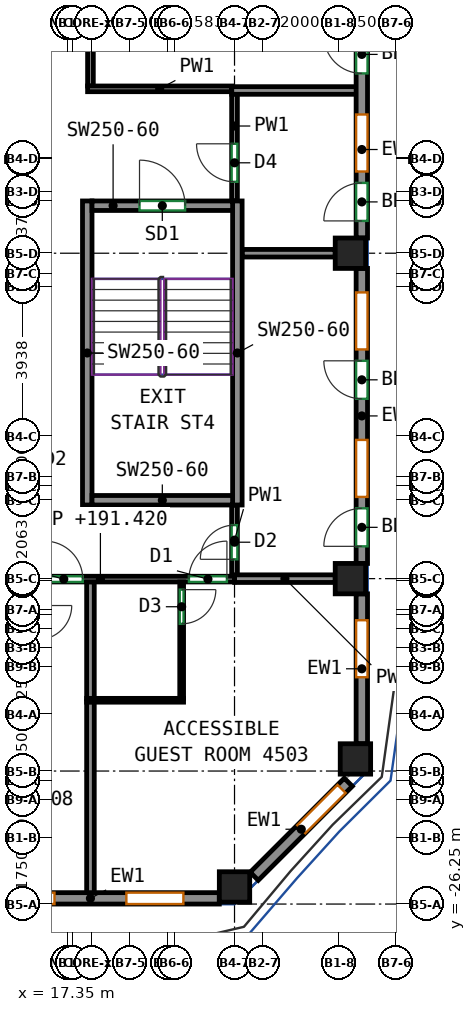
"""IFC4 building model, lengths in metres.
Left out: names, types, materials, properties, quantities, classifications, styles, units other than length and angle.
Written with IfcOpenShell. Run it as: python <this file> out.ifc"""

import sys

from ifc_helpers import new_model, si_unit, direction, frame, frame_2d, origin, origin_2d, place, context, subcontext, project, spatial, rectangle, extrude, source, transform, mapped, element, fill, save


model = new_model("IFC4")
c1 = context("Model", 3, precision=1e-05, world=origin(), true_north=direction((0.0, 1.0)))
c2 = subcontext(c1, "Body", "Model", "MODEL_VIEW")
j1 = project(units=[si_unit("LENGTHUNIT", "METRE"), si_unit("PLANEANGLEUNIT", "RADIAN")], contexts=[c1])
p1 = place(None, origin())
s1 = spatial("IfcSite", under=j1, at=p1, CompositionType="ELEMENT")
p2 = place(p1, origin())
s2 = spatial("IfcBuilding", under=s1, at=p2, CompositionType="ELEMENT")
p3 = place(p2, frame((0.0, 0.0, 188.9)))
s3 = spatial("IfcBuildingStorey", under=s2, at=p3, CompositionType="ELEMENT", Elevation=188.9)
m1 = source(origin(), c2, "Body", "SweptSolid", [
    extrude(rectangle(XDim=0.8, YDim=0.8, at=origin_2d()), origin(), (0.0, 0.0, 1.0), 3.12),
])
for number, where, z_axis, x_axis in (
    (1, (21.75, -25.8, 0.0), (0.0, 0.0, 1.0), (1.0, 0.0, 0.0)),
    (2, (24.8, -17.688, 0.0), (0.0, 0.0, 1.0), (1.0, 0.0, 0.0)),
    (3, (24.8, -9.125, 0.0), (0.0, 0.0, 1.0), (1.0, 0.0, 0.0)),
    (4, (24.932, -22.432, 0.0), (0.0, 0.0, 1.0), (1.0, 0.0, 0.0)),
):
    element("IfcColumn", number, at=place(p3, frame(where, z_axis=z_axis, x_axis=x_axis)), inside=s3, PredefinedType="COLUMN", context=c2, shape_type="MappedRepresentation", body=[
        mapped(m1, transform((0.0, 0.0, 0.0))),
    ])
m2 = source(origin(), c2, "Body", "SweptSolid", [
    extrude(rectangle(XDim=8.0, YDim=0.25, at=frame_2d((4.0, 0.0))), origin(), (0.0, 0.0, 1.0), 3.12),
])
for number, where, z_axis, x_axis in (
    (5, (17.875, -15.75, 0.0), (0.0, 0.0, 1.0), (0.0, 1.0, 0.0)),
    (6, (21.825, -15.75, 0.0), (0.0, 0.0, 1.0), (0.0, 1.0, 0.0)),
):
    element("IfcWall", number, at=place(p3, frame(where, z_axis=z_axis, x_axis=x_axis)), inside=s3, PredefinedType="SHEAR", context=c2, shape_type="MappedRepresentation", body=[
        mapped(m2, transform((0.0, 0.0, 0.0))),
    ])
m3 = source(origin(), c2, "Body", "SweptSolid", [
    extrude(rectangle(XDim=3.7, YDim=0.25, at=frame_2d((1.85, 0.0))), origin(), (0.0, 0.0, 1.0), 3.12),
])
p4 = place(p3, frame((18.0, -15.625, 0.0), z_axis=(0.0, 0.0, 1.0), x_axis=(1.0, 0.0, 0.0)))
e7 = element("IfcWall", 7, at=p4, inside=s3, PredefinedType="SHEAR", context=c2, shape_type="MappedRepresentation", body=[
    mapped(m3, transform((0.0, 0.0, 0.0))),
])
p5 = place(p3, frame((18.0, -7.875, 0.0), z_axis=(0.0, 0.0, 1.0), x_axis=(1.0, 0.0, 0.0)))
e8 = element("IfcWall", 8, at=p5, inside=s3, PredefinedType="SHEAR", context=c2, shape_type="MappedRepresentation", body=[
    mapped(m3, transform((0.0, 0.0, 0.0))),
])
p6 = place(p5, frame((1.25, 0.0, 0.0)))
e9 = element("IfcOpeningElement", 9, at=p6, cuts=e8, PredefinedType="OPENING", context=c2, shape_type="SweptSolid", body=[
    extrude(rectangle(XDim=1.2, YDim=2.1, at=frame_2d((0.6, 1.05))), frame((0.0, 0.135, 0.0), z_axis=(0.0, -1.0, 0.0), x_axis=(1.0, 0.0, 0.0)), (0.0, 0.0, 1.0), 0.27),
])
m4 = source(origin(), c2, "Body", "SweptSolid", [
    extrude(rectangle(XDim=6.783, YDim=0.3, at=frame_2d((3.392, 0.0))), origin(), (0.0, 0.0, 1.0), 3.12),
])
p7 = place(p3, frame((14.567, -26.1, 0.0), z_axis=(0.0, 0.0, 1.0), x_axis=(1.0, 0.0, 0.0)))
e10 = element("IfcWall", 10, at=p7, inside=s3, PredefinedType="SOLIDWALL", context=c2, shape_type="MappedRepresentation", body=[
    mapped(m4, transform((0.0, 0.0, 0.0))),
])
p8 = place(p7, frame((0.946, 0.0, 0.85)))
e11 = element("IfcOpeningElement", 11, at=p8, cuts=e10, PredefinedType="OPENING", context=c2, shape_type="SweptSolid", body=[
    extrude(rectangle(XDim=1.5, YDim=1.95, at=frame_2d((0.75, 0.975))), frame((0.0, 0.16, 0.0), z_axis=(0.0, -1.0, 0.0), x_axis=(1.0, 0.0, 0.0)), (0.0, 0.0, 1.0), 0.32),
])
p9 = place(p7, frame((4.337, 0.0, 0.85)))
e12 = element("IfcOpeningElement", 12, at=p9, cuts=e10, PredefinedType="OPENING", context=c2, shape_type="SweptSolid", body=[
    extrude(rectangle(XDim=1.5, YDim=1.95, at=frame_2d((0.75, 0.975))), frame((0.0, 0.16, 0.0), z_axis=(0.0, -1.0, 0.0), x_axis=(1.0, 0.0, 0.0)), (0.0, 0.0, 1.0), 0.32),
])
m5 = source(origin(), c2, "Body", "SweptSolid", [
    extrude(rectangle(XDim=3.5, YDim=0.3, at=frame_2d((1.75, 0.0))), origin(), (0.0, 0.0, 1.0), 3.12),
])
p10 = place(p3, frame((22.269, -25.519, 0.0), z_axis=(0.0, 0.0, 1.0), x_axis=(0.707141656123, 0.70707190453, 0.0)))
e13 = element("IfcWall", 13, at=p10, inside=s3, PredefinedType="SOLIDWALL", context=c2, shape_type="MappedRepresentation", body=[
    mapped(m5, transform((0.0, 0.0, 0.0))),
])
p11 = place(p10, frame((1.75, 0.0, 0.85)))
e14 = element("IfcOpeningElement", 14, at=p11, cuts=e13, PredefinedType="OPENING", context=c2, shape_type="SweptSolid", body=[
    extrude(rectangle(XDim=1.5, YDim=1.95, at=frame_2d((0.75, 0.975))), frame((0.0, 0.16, 0.0), z_axis=(0.0, -1.0, 0.0), x_axis=(1.0, 0.0, 0.0)), (0.0, 0.0, 1.0), 0.32),
])
m6 = source(origin(), c2, "Body", "SweptSolid", [
    extrude(rectangle(XDim=3.944, YDim=0.3, at=frame_2d((1.972, 0.0))), origin(), (0.0, 0.0, 1.0), 3.12),
])
p12 = place(p3, frame((25.1, -22.032, 0.0), z_axis=(0.0, 0.0, 1.0), x_axis=(0.0, 1.0, 0.0)))
e15 = element("IfcWall", 15, at=p12, inside=s3, PredefinedType="SOLIDWALL", context=c2, shape_type="MappedRepresentation", body=[
    mapped(m6, transform((0.0, 0.0, 0.0))),
])
p13 = place(p12, frame((1.75, 0.0, 0.85)))
e16 = element("IfcOpeningElement", 16, at=p13, cuts=e15, PredefinedType="OPENING", context=c2, shape_type="SweptSolid", body=[
    extrude(rectangle(XDim=1.5, YDim=1.95, at=frame_2d((0.75, 0.975))), frame((0.0, 0.16, 0.0), z_axis=(0.0, -1.0, 0.0), x_axis=(1.0, 0.0, 0.0)), (0.0, 0.0, 1.0), 0.32),
])
m7 = source(origin(), c2, "Body", "SweptSolid", [
    extrude(rectangle(XDim=7.763, YDim=0.3, at=frame_2d((3.881, 0.0))), origin(), (0.0, 0.0, 1.0), 3.12),
])
p14 = place(p3, frame((25.1, -17.288, 0.0), z_axis=(0.0, 0.0, 1.0), x_axis=(0.0, 1.0, 0.0)))
e17 = element("IfcWall", 17, at=p14, inside=s3, PredefinedType="SOLIDWALL", context=c2, shape_type="MappedRepresentation", body=[
    mapped(m7, transform((0.0, 0.0, 0.0))),
])
p15 = place(p14, frame((1.75, 0.0, 0.85)))
e18 = element("IfcOpeningElement", 18, at=p15, cuts=e17, PredefinedType="OPENING", context=c2, shape_type="SweptSolid", body=[
    extrude(rectangle(XDim=1.5, YDim=1.95, at=frame_2d((0.75, 0.975))), frame((0.0, 0.16, 0.0), z_axis=(0.0, -1.0, 0.0), x_axis=(1.0, 0.0, 0.0)), (0.0, 0.0, 1.0), 0.32),
])
p16 = place(p14, frame((0.45, 0.0, 0.0)))
e19 = element("IfcOpeningElement", 19, at=p16, cuts=e17, PredefinedType="OPENING", context=c2, shape_type="SweptSolid", body=[
    extrude(rectangle(XDim=1.0, YDim=2.1, at=frame_2d((0.5, 1.05))), frame((0.0, 0.16, 0.0), z_axis=(0.0, -1.0, 0.0), x_axis=(1.0, 0.0, 0.0)), (0.0, 0.0, 1.0), 0.32),
])
p17 = place(p14, frame((5.631, 0.0, 0.85)))
e20 = element("IfcOpeningElement", 20, at=p17, cuts=e17, PredefinedType="OPENING", context=c2, shape_type="SweptSolid", body=[
    extrude(rectangle(XDim=1.5, YDim=1.95, at=frame_2d((0.75, 0.975))), frame((0.0, 0.16, 0.0), z_axis=(0.0, -1.0, 0.0), x_axis=(1.0, 0.0, 0.0)), (0.0, 0.0, 1.0), 0.32),
])
p18 = place(p14, frame((4.331, 0.0, 0.0)))
e21 = element("IfcOpeningElement", 21, at=p18, cuts=e17, PredefinedType="OPENING", context=c2, shape_type="SweptSolid", body=[
    extrude(rectangle(XDim=1.0, YDim=2.1, at=frame_2d((0.5, 1.05))), frame((0.0, 0.16, 0.0), z_axis=(0.0, -1.0, 0.0), x_axis=(1.0, 0.0, 0.0)), (0.0, 0.0, 1.0), 0.32),
])
p19 = place(p3, frame((25.1, -8.725, 0.0), z_axis=(0.0, 0.0, 1.0), x_axis=(0.0, 1.0, 0.0)))
e22 = element("IfcWall", 22, at=p19, inside=s3, PredefinedType="SOLIDWALL", context=c2, shape_type="MappedRepresentation", body=[
    mapped(m7, transform((0.0, 0.0, 0.0))),
])
p20 = place(p19, frame((1.75, 0.0, 0.85)))
e23 = element("IfcOpeningElement", 23, at=p20, cuts=e22, PredefinedType="OPENING", context=c2, shape_type="SweptSolid", body=[
    extrude(rectangle(XDim=1.5, YDim=1.95, at=frame_2d((0.75, 0.975))), frame((0.0, 0.16, 0.0), z_axis=(0.0, -1.0, 0.0), x_axis=(1.0, 0.0, 0.0)), (0.0, 0.0, 1.0), 0.32),
])
p21 = place(p19, frame((0.45, 0.0, 0.0)))
e24 = element("IfcOpeningElement", 24, at=p21, cuts=e22, PredefinedType="OPENING", context=c2, shape_type="SweptSolid", body=[
    extrude(rectangle(XDim=1.0, YDim=2.1, at=frame_2d((0.5, 1.05))), frame((0.0, 0.16, 0.0), z_axis=(0.0, -1.0, 0.0), x_axis=(1.0, 0.0, 0.0)), (0.0, 0.0, 1.0), 0.32),
])
p22 = place(p19, frame((5.631, 0.0, 0.85)))
e25 = element("IfcOpeningElement", 25, at=p22, cuts=e22, PredefinedType="OPENING", context=c2, shape_type="SweptSolid", body=[
    extrude(rectangle(XDim=1.5, YDim=1.95, at=frame_2d((0.75, 0.975))), frame((0.0, 0.16, 0.0), z_axis=(0.0, -1.0, 0.0), x_axis=(1.0, 0.0, 0.0)), (0.0, 0.0, 1.0), 0.32),
])
p23 = place(p19, frame((4.331, 0.0, 0.0)))
e26 = element("IfcOpeningElement", 26, at=p23, cuts=e22, PredefinedType="OPENING", context=c2, shape_type="SweptSolid", body=[
    extrude(rectangle(XDim=1.0, YDim=2.1, at=frame_2d((0.5, 1.05))), frame((0.0, 0.16, 0.0), z_axis=(0.0, -1.0, 0.0), x_axis=(1.0, 0.0, 0.0)), (0.0, 0.0, 1.0), 0.32),
])
p24 = place(p3, frame((14.692, -17.7, 0.0), z_axis=(0.0, 0.0, 1.0), x_axis=(1.0, 0.0, 0.0)))
e27 = element("IfcWall", 27, at=p24, inside=s3, PredefinedType="PARTITIONING", context=c2, shape_type="SweptSolid", body=[
    extrude(rectangle(XDim=7.058, YDim=0.15, at=frame_2d((3.529, 0.0))), origin(), (0.0, 0.0, 1.0), 2.52),
])
p25 = place(p24, frame((2.065, 0.0, 0.0)))
e28 = element("IfcOpeningElement", 28, at=p25, cuts=e27, PredefinedType="OPENING", context=c2, shape_type="SweptSolid", body=[
    extrude(rectangle(XDim=1.0, YDim=2.1, at=frame_2d((0.5, 1.05))), frame((0.0, 0.085, 0.0), z_axis=(0.0, -1.0, 0.0), x_axis=(1.0, 0.0, 0.0)), (0.0, 0.0, 1.0), 0.17),
])
p26 = place(p24, frame((5.858, 0.0, 0.0)))
e29 = element("IfcOpeningElement", 29, at=p26, cuts=e27, PredefinedType="OPENING", context=c2, shape_type="SweptSolid", body=[
    extrude(rectangle(XDim=1.0, YDim=2.1, at=frame_2d((0.5, 1.05))), frame((0.0, 0.085, 0.0), z_axis=(0.0, -1.0, 0.0), x_axis=(1.0, 0.0, 0.0)), (0.0, 0.0, 1.0), 0.17),
])
p27 = place(p3, frame((17.959, -4.725, 0.0), z_axis=(0.0, 0.0, 1.0), x_axis=(0.0, 1.0, 0.0)))
e30 = element("IfcWall", 30, at=p27, inside=s3, PredefinedType="PARTITIONING", context=c2, shape_type="SweptSolid", body=[
    extrude(rectangle(XDim=8.35, YDim=0.15, at=frame_2d((4.175, 0.0))), origin(), (0.0, 0.0, 1.0), 3.12),
])
p28 = place(p27, frame((5.236, 0.0, 0.0)))
e31 = element("IfcOpeningElement", 31, at=p28, cuts=e30, PredefinedType="OPENING", context=c2, shape_type="SweptSolid", body=[
    extrude(rectangle(XDim=0.9, YDim=2.1, at=frame_2d((0.45, 1.05))), frame((0.0, 0.085, 0.0), z_axis=(0.0, -1.0, 0.0), x_axis=(1.0, 0.0, 0.0)), (0.0, 0.0, 1.0), 0.17),
])
p29 = place(p3, frame((17.884, -4.8, 0.0), z_axis=(0.0, 0.0, 1.0), x_axis=(1.0, 0.0, 0.0)))
e32 = element("IfcWall", 32, at=p29, inside=s3, PredefinedType="PARTITIONING", context=c2, shape_type="SweptSolid", body=[
    extrude(rectangle(XDim=3.793, YDim=0.15, at=frame_2d((1.896, 0.0))), origin(), (0.0, 0.0, 1.0), 3.12),
])
p30 = place(p3, frame((21.75, -7.75, 0.0), z_axis=(0.0, 0.0, 1.0), x_axis=(0.0, 1.0, 0.0)))
e33 = element("IfcWall", 33, at=p30, inside=s3, PredefinedType="PARTITIONING", context=c2, shape_type="SweptSolid", body=[
    extrude(rectangle(XDim=2.817, YDim=0.15, at=frame_2d((1.408, 0.0))), origin(), (0.0, 0.0, 1.0), 3.12),
])
p31 = place(p30, frame((0.504, 0.0, 0.0)))
e34 = element("IfcOpeningElement", 34, at=p31, cuts=e33, PredefinedType="OPENING", context=c2, shape_type="SweptSolid", body=[
    extrude(rectangle(XDim=1.0, YDim=2.1, at=frame_2d((0.5, 1.05))), frame((0.0, 0.085, 0.0), z_axis=(0.0, -1.0, 0.0), x_axis=(1.0, 0.0, 0.0)), (0.0, 0.0, 1.0), 0.17),
])
p32 = place(p3, frame((21.75, -17.598, 0.0), z_axis=(0.0, 0.0, 1.0), x_axis=(0.0, 1.0, 0.0)))
e35 = element("IfcWall", 35, at=p32, inside=s3, PredefinedType="PARTITIONING", context=c2, shape_type="SweptSolid", body=[
    extrude(rectangle(XDim=1.848, YDim=0.15, at=frame_2d((0.924, 0.0))), origin(), (0.0, 0.0, 1.0), 3.12),
])
p33 = place(p32, frame((0.419, 0.0, 0.0)))
e36 = element("IfcOpeningElement", 36, at=p33, cuts=e35, PredefinedType="OPENING", context=c2, shape_type="SweptSolid", body=[
    extrude(rectangle(XDim=0.9, YDim=2.1, at=frame_2d((0.45, 1.05))), frame((0.0, 0.085, 0.0), z_axis=(0.0, -1.0, 0.0), x_axis=(1.0, 0.0, 0.0)), (0.0, 0.0, 1.0), 0.17),
])
p34 = place(p3, frame((17.959, -26.0, 0.0), z_axis=(0.0, 0.0, 1.0), x_axis=(0.0, 1.0, 0.0)))
e37 = element("IfcWall", 37, at=p34, inside=s3, PredefinedType="PARTITIONING", context=c2, shape_type="SweptSolid", body=[
    extrude(rectangle(XDim=5.072, YDim=0.2, at=frame_2d((2.536, 0.0))), origin(), (0.0, 0.0, 1.0), 3.12),
])
p35 = place(p3, frame((17.959, -20.848, 0.0), z_axis=(0.0, 0.0, 1.0), x_axis=(0.0, 1.0, 0.0)))
e38 = element("IfcWall", 38, at=p35, inside=s3, PredefinedType="PARTITIONING", context=c2, shape_type="SweptSolid", body=[
    extrude(rectangle(XDim=3.071, YDim=0.2, at=frame_2d((1.535, 0.0))), origin(), (0.0, 0.0, 1.0), 3.12),
])
p36 = place(p3, frame((17.859, -20.888, 0.0), z_axis=(0.0, 0.0, 1.0), x_axis=(1.0, 0.0, 0.0)))
e39 = element("IfcWall", 39, at=p36, inside=s3, PredefinedType="PARTITIONING", context=c2, shape_type="SweptSolid", body=[
    extrude(rectangle(XDim=2.55, YDim=0.1, at=frame_2d((1.275, 0.0))), origin(), (0.0, 0.0, 1.0), 3.12),
])
p37 = place(p3, frame((20.359, -17.777, 0.0), z_axis=(0.0, 0.0, 1.0), x_axis=(0.0, -1.0, 0.0)))
e40 = element("IfcWall", 40, at=p37, inside=s3, PredefinedType="PARTITIONING", context=c2, shape_type="SweptSolid", body=[
    extrude(rectangle(XDim=3.061, YDim=0.1, at=frame_2d((1.53, 0.0))), origin(), (0.0, 0.0, 1.0), 3.12),
])
p38 = place(p37, frame((0.2, 0.0, 0.0)))
e41 = element("IfcOpeningElement", 41, at=p38, cuts=e40, PredefinedType="OPENING", context=c2, shape_type="SweptSolid", body=[
    extrude(rectangle(XDim=0.9, YDim=2.1, at=frame_2d((0.45, 1.05))), frame((0.0, 0.06, 0.0), z_axis=(0.0, -1.0, 0.0), x_axis=(1.0, 0.0, 0.0)), (0.0, 0.0, 1.0), 0.12),
])
p39 = place(p3, frame((21.752, -17.688, 0.0), z_axis=(0.0, 0.0, 1.0), x_axis=(1.0, 0.0, 0.0)))
e42 = element("IfcWall", 42, at=p39, inside=s3, PredefinedType="PARTITIONING", context=c2, shape_type="SweptSolid", body=[
    extrude(rectangle(XDim=2.648, YDim=0.2, at=frame_2d((1.324, 0.0))), origin(), (0.0, 0.0, 1.0), 2.52),
])
p40 = place(p3, frame((21.677, -4.843, 0.0), z_axis=(0.0, 0.0, 1.0), x_axis=(1.0, 0.0, 0.0)))
e43 = element("IfcWall", 43, at=p40, inside=s3, PredefinedType="PARTITIONING", context=c2, shape_type="SweptSolid", body=[
    extrude(rectangle(XDim=3.323, YDim=0.2, at=frame_2d((1.662, 0.0))), origin(), (0.0, 0.0, 1.0), 3.12),
])
p41 = place(p3, frame((21.95, -9.125, 0.0), z_axis=(0.0, 0.0, 1.0), x_axis=(1.0, 0.0, 0.0)))
e44 = element("IfcWall", 44, at=p41, inside=s3, PredefinedType="PARTITIONING", context=c2, shape_type="SweptSolid", body=[
    extrude(rectangle(XDim=2.45, YDim=0.2, at=frame_2d((1.225, 0.0))), origin(), (0.0, 0.0, 1.0), 3.12),
])
p42 = place(p8, origin())
e45 = element("IfcWindow", 45, at=p42, inside=s3, PartitioningType="SINGLE_PANEL", PredefinedType="WINDOW", context=c2, shape_type="SweptSolid", body=[
    extrude(rectangle(XDim=1.5, YDim=1.95, at=frame_2d((0.75, 0.975))), frame((0.0, 0.03, 0.0), z_axis=(0.0, -1.0, 0.0), x_axis=(1.0, 0.0, 0.0)), (0.0, 0.0, 1.0), 0.06),
])
fill(e11, e45)
p43 = place(p9, origin())
e46 = element("IfcWindow", 46, at=p43, inside=s3, PartitioningType="SINGLE_PANEL", PredefinedType="WINDOW", context=c2, shape_type="SweptSolid", body=[
    extrude(rectangle(XDim=1.5, YDim=1.95, at=frame_2d((0.75, 0.975))), frame((0.0, 0.03, 0.0), z_axis=(0.0, -1.0, 0.0), x_axis=(1.0, 0.0, 0.0)), (0.0, 0.0, 1.0), 0.06),
])
fill(e12, e46)
p44 = place(p11, origin())
e47 = element("IfcWindow", 47, at=p44, inside=s3, PartitioningType="SINGLE_PANEL", PredefinedType="WINDOW", context=c2, shape_type="SweptSolid", body=[
    extrude(rectangle(XDim=1.5, YDim=1.95, at=frame_2d((0.75, 0.975))), frame((0.0, 0.03, 0.0), z_axis=(0.0, -1.0, 0.0), x_axis=(1.0, 0.0, 0.0)), (0.0, 0.0, 1.0), 0.06),
])
fill(e14, e47)
p45 = place(p13, origin())
e48 = element("IfcWindow", 48, at=p45, inside=s3, PartitioningType="SINGLE_PANEL", PredefinedType="WINDOW", context=c2, shape_type="SweptSolid", body=[
    extrude(rectangle(XDim=1.5, YDim=1.95, at=frame_2d((0.75, 0.975))), frame((0.0, 0.03, 0.0), z_axis=(0.0, -1.0, 0.0), x_axis=(1.0, 0.0, 0.0)), (0.0, 0.0, 1.0), 0.06),
])
fill(e16, e48)
p46 = place(p15, origin())
e49 = element("IfcWindow", 49, at=p46, inside=s3, PartitioningType="SINGLE_PANEL", PredefinedType="WINDOW", context=c2, shape_type="SweptSolid", body=[
    extrude(rectangle(XDim=1.5, YDim=1.95, at=frame_2d((0.75, 0.975))), frame((0.0, 0.03, 0.0), z_axis=(0.0, -1.0, 0.0), x_axis=(1.0, 0.0, 0.0)), (0.0, 0.0, 1.0), 0.06),
])
fill(e18, e49)
p47 = place(p16, origin())
e50 = element("IfcDoor", 50, at=p47, inside=s3, OperationType="SINGLE_SWING_LEFT", PredefinedType="DOOR", context=c2, shape_type="SweptSolid", body=[
    extrude(rectangle(XDim=1.0, YDim=2.1, at=frame_2d((0.5, 1.05))), frame((0.0, 0.025, 0.0), z_axis=(0.0, -1.0, 0.0), x_axis=(1.0, 0.0, 0.0)), (0.0, 0.0, 1.0), 0.05),
])
fill(e19, e50)
p48 = place(p17, origin())
e51 = element("IfcWindow", 51, at=p48, inside=s3, PartitioningType="SINGLE_PANEL", PredefinedType="WINDOW", context=c2, shape_type="SweptSolid", body=[
    extrude(rectangle(XDim=1.5, YDim=1.95, at=frame_2d((0.75, 0.975))), frame((0.0, 0.03, 0.0), z_axis=(0.0, -1.0, 0.0), x_axis=(1.0, 0.0, 0.0)), (0.0, 0.0, 1.0), 0.06),
])
fill(e20, e51)
p49 = place(p18, origin())
e52 = element("IfcDoor", 52, at=p49, inside=s3, OperationType="SINGLE_SWING_RIGHT", PredefinedType="DOOR", context=c2, shape_type="SweptSolid", body=[
    extrude(rectangle(XDim=1.0, YDim=2.1, at=frame_2d((0.5, 1.05))), frame((0.0, 0.025, 0.0), z_axis=(0.0, -1.0, 0.0), x_axis=(1.0, 0.0, 0.0)), (0.0, 0.0, 1.0), 0.05),
])
fill(e21, e52)
p50 = place(p20, origin())
e53 = element("IfcWindow", 53, at=p50, inside=s3, PartitioningType="SINGLE_PANEL", PredefinedType="WINDOW", context=c2, shape_type="SweptSolid", body=[
    extrude(rectangle(XDim=1.5, YDim=1.95, at=frame_2d((0.75, 0.975))), frame((0.0, 0.03, 0.0), z_axis=(0.0, -1.0, 0.0), x_axis=(1.0, 0.0, 0.0)), (0.0, 0.0, 1.0), 0.06),
])
fill(e23, e53)
p51 = place(p21, origin())
e54 = element("IfcDoor", 54, at=p51, inside=s3, OperationType="SINGLE_SWING_LEFT", PredefinedType="DOOR", context=c2, shape_type="SweptSolid", body=[
    extrude(rectangle(XDim=1.0, YDim=2.1, at=frame_2d((0.5, 1.05))), frame((0.0, 0.025, 0.0), z_axis=(0.0, -1.0, 0.0), x_axis=(1.0, 0.0, 0.0)), (0.0, 0.0, 1.0), 0.05),
])
fill(e24, e54)
p52 = place(p23, origin())
e55 = element("IfcDoor", 55, at=p52, inside=s3, OperationType="SINGLE_SWING_RIGHT", PredefinedType="DOOR", context=c2, shape_type="SweptSolid", body=[
    extrude(rectangle(XDim=1.0, YDim=2.1, at=frame_2d((0.5, 1.05))), frame((0.0, 0.025, 0.0), z_axis=(0.0, -1.0, 0.0), x_axis=(1.0, 0.0, 0.0)), (0.0, 0.0, 1.0), 0.05),
])
fill(e26, e55)
p53 = place(p6, origin())
e56 = element("IfcDoor", 56, at=p53, inside=s3, OperationType="DOUBLE_DOOR_SINGLE_SWING", PredefinedType="DOOR", context=c2, shape_type="SweptSolid", body=[
    extrude(rectangle(XDim=1.2, YDim=2.1, at=frame_2d((0.6, 1.05))), frame((0.0, 0.025, 0.0), z_axis=(0.0, -1.0, 0.0), x_axis=(1.0, 0.0, 0.0)), (0.0, 0.0, 1.0), 0.05),
])
fill(e9, e56)
p54 = place(p38, origin())
e57 = element("IfcDoor", 57, at=p54, inside=s3, OperationType="SINGLE_SWING_LEFT", PredefinedType="DOOR", context=c2, shape_type="SweptSolid", body=[
    extrude(rectangle(XDim=0.9, YDim=2.1, at=frame_2d((0.45, 1.05))), frame((0.0, 0.025, 0.0), z_axis=(0.0, -1.0, 0.0), x_axis=(1.0, 0.0, 0.0)), (0.0, 0.0, 1.0), 0.05),
])
fill(e41, e57)
p55 = place(p25, origin())
e58 = element("IfcDoor", 58, at=p55, inside=s3, OperationType="SINGLE_SWING_LEFT", PredefinedType="DOOR", context=c2, shape_type="SweptSolid", body=[
    extrude(rectangle(XDim=1.0, YDim=2.1, at=frame_2d((0.5, 1.05))), frame((0.0, 0.025, 0.0), z_axis=(0.0, -1.0, 0.0), x_axis=(1.0, 0.0, 0.0)), (0.0, 0.0, 1.0), 0.05),
])
fill(e28, e58)
p56 = place(p26, origin())
e59 = element("IfcDoor", 59, at=p56, inside=s3, OperationType="SINGLE_SWING_RIGHT", PredefinedType="DOOR", context=c2, shape_type="SweptSolid", body=[
    extrude(rectangle(XDim=1.0, YDim=2.1, at=frame_2d((0.5, 1.05))), frame((0.0, 0.025, 0.0), z_axis=(0.0, -1.0, 0.0), x_axis=(1.0, 0.0, 0.0)), (0.0, 0.0, 1.0), 0.05),
])
fill(e29, e59)
p57 = place(p33, origin())
e60 = element("IfcDoor", 60, at=p57, inside=s3, OperationType="SINGLE_SWING_LEFT", PredefinedType="DOOR", context=c2, shape_type="SweptSolid", body=[
    extrude(rectangle(XDim=0.9, YDim=2.1, at=frame_2d((0.45, 1.05))), frame((0.0, 0.025, 0.0), z_axis=(0.0, -1.0, 0.0), x_axis=(1.0, 0.0, 0.0)), (0.0, 0.0, 1.0), 0.05),
])
fill(e36, e60)
p58 = place(p31, origin())
e61 = element("IfcDoor", 61, at=p58, inside=s3, OperationType="SINGLE_SWING_RIGHT", PredefinedType="DOOR", context=c2, shape_type="SweptSolid", body=[
    extrude(rectangle(XDim=1.0, YDim=2.1, at=frame_2d((0.5, 1.05))), frame((0.0, 0.025, 0.0), z_axis=(0.0, -1.0, 0.0), x_axis=(1.0, 0.0, 0.0)), (0.0, 0.0, 1.0), 0.05),
])
fill(e34, e61)
save(model, sys.argv[1])
